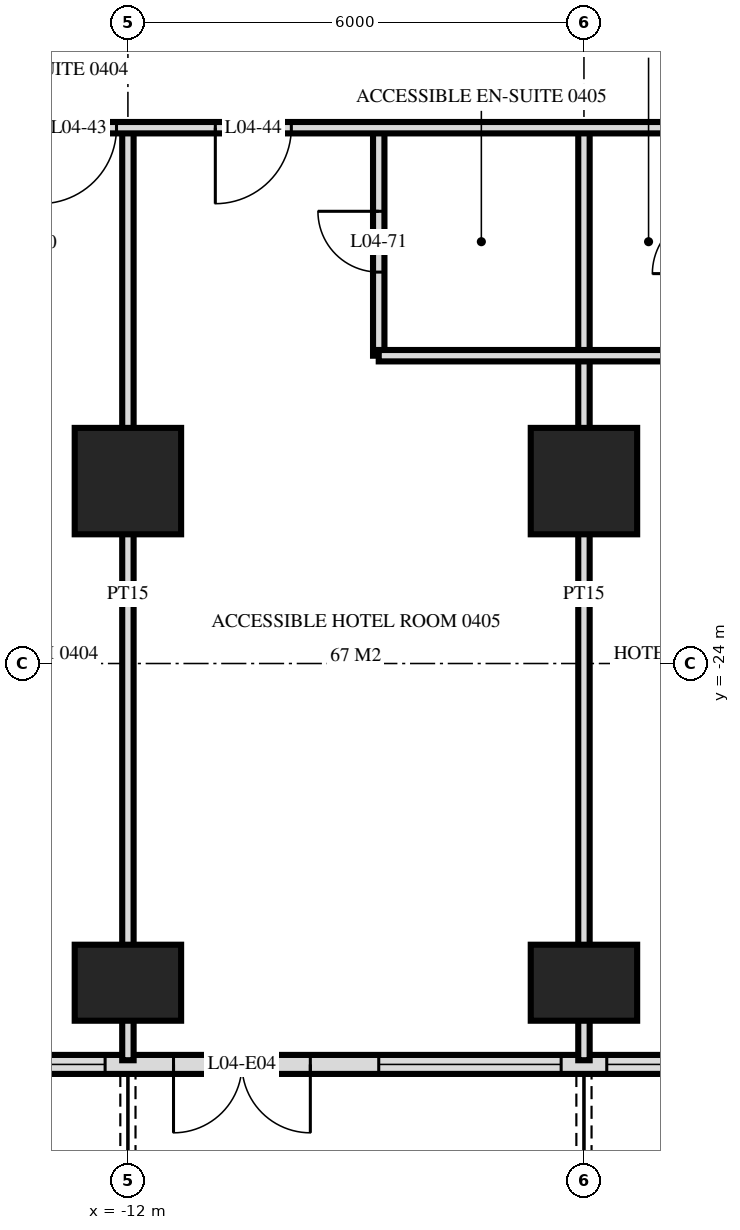
"""IFC4 building model, lengths in metres.
Left out: names, types, materials, properties, quantities, classifications, styles, units other than length and angle.
Written with IfcOpenShell. Run it as: python <this file> out.ifc"""

import sys

from ifc_helpers import new_model, si_unit, direction, frame, frame_2d, origin, origin_2d, place, context, subcontext, project, spatial, rectangle, extrude, element, fill, save


model = new_model("IFC4")
c1 = context("Model", 3, precision=1e-05, world=origin(), true_north=direction((0.0, 1.0)))
c2 = subcontext(c1, "Body", "Model", "MODEL_VIEW")
j1 = project(units=[si_unit("LENGTHUNIT", "METRE"), si_unit("PLANEANGLEUNIT", "RADIAN")], contexts=[c1])
p1 = place(None, origin())
s1 = spatial("IfcSite", under=j1, at=p1, CompositionType="ELEMENT")
p2 = place(p1, origin())
s2 = spatial("IfcBuilding", under=s1, at=p2, CompositionType="ELEMENT")
p3 = place(p2, frame((0.0, 0.0, 24.0)))
s3 = spatial("IfcBuildingStorey", under=s2, at=p3, CompositionType="ELEMENT", Elevation=24.0)
p4 = place(p3, frame((-12.0, -28.2, -0.28), z_axis=(0.0, 0.0, 1.0), x_axis=(1.0, 0.0, 0.0)))
e1 = element("IfcColumn", 1, at=p4, inside=s3, PredefinedType="COLUMN", context=c2, shape_type="SweptSolid", body=[
    extrude(rectangle(XDim=1.4, YDim=1.0, at=origin_2d()), origin(), (0.0, 0.0, 1.0), 3.88),
])
p5 = place(p3, frame((-12.0, -21.6, -0.28), z_axis=(0.0, 0.0, 1.0), x_axis=(1.0, 0.0, 0.0)))
e2 = element("IfcColumn", 2, at=p5, inside=s3, PredefinedType="COLUMN", context=c2, shape_type="SweptSolid", body=[
    extrude(rectangle(XDim=1.4, YDim=1.4, at=origin_2d()), origin(), (0.0, 0.0, 1.0), 3.88),
])
p6 = place(p3, frame((-6.0, -28.2, -0.28), z_axis=(0.0, 0.0, 1.0), x_axis=(1.0, 0.0, 0.0)))
e3 = element("IfcColumn", 3, at=p6, inside=s3, PredefinedType="COLUMN", context=c2, shape_type="SweptSolid", body=[
    extrude(rectangle(XDim=1.4, YDim=1.0, at=origin_2d()), origin(), (0.0, 0.0, 1.0), 3.88),
])
p7 = place(p3, frame((-6.0, -21.6, -0.28), z_axis=(0.0, 0.0, 1.0), x_axis=(1.0, 0.0, 0.0)))
e4 = element("IfcColumn", 4, at=p7, inside=s3, PredefinedType="COLUMN", context=c2, shape_type="SweptSolid", body=[
    extrude(rectangle(XDim=1.4, YDim=1.4, at=origin_2d()), origin(), (0.0, 0.0, 1.0), 3.88),
])
p8 = place(p3, frame((-28.775, -29.275, 0.0), z_axis=(0.0, 0.0, 1.0), x_axis=(1.0, 0.0, 0.0)))
e5 = element("IfcWall", 5, at=p8, inside=s3, PredefinedType="SOLIDWALL", context=c2, shape_type="SweptSolid", body=[
    extrude(rectangle(XDim=57.551, YDim=0.25, at=frame_2d((28.775, 0.0))), origin(), (0.0, 0.0, 1.0), 3.32),
])
p9 = place(p8, frame((0.575, 0.0, 0.0)))
e6 = element("IfcOpeningElement", 6, at=p9, cuts=e5, PredefinedType="OPENING", context=c2, shape_type="SweptSolid", body=[
    extrude(rectangle(XDim=1.8, YDim=2.4, at=frame_2d((0.9, 1.2))), frame((0.0, 0.135, 0.0), z_axis=(0.0, -1.0, 0.0), x_axis=(1.0, 0.0, 0.0)), (0.0, 0.0, 1.0), 0.27),
])
p10 = place(p8, frame((5.375, 0.0, 0.0)))
e7 = element("IfcOpeningElement", 7, at=p10, cuts=e5, PredefinedType="OPENING", context=c2, shape_type="SweptSolid", body=[
    extrude(rectangle(XDim=1.8, YDim=2.4, at=frame_2d((0.9, 1.2))), frame((0.0, 0.135, 0.0), z_axis=(0.0, -1.0, 0.0), x_axis=(1.0, 0.0, 0.0)), (0.0, 0.0, 1.0), 0.27),
])
p11 = place(p8, frame((8.075, 0.0, 0.3)))
e8 = element("IfcOpeningElement", 8, at=p11, cuts=e5, PredefinedType="OPENING", context=c2, shape_type="SweptSolid", body=[
    extrude(rectangle(XDim=2.4, YDim=2.1, at=frame_2d((1.2, 1.05))), frame((0.0, 0.135, 0.0), z_axis=(0.0, -1.0, 0.0), x_axis=(1.0, 0.0, 0.0)), (0.0, 0.0, 1.0), 0.27),
])
p12 = place(p8, frame((11.375, 0.0, 0.0)))
e9 = element("IfcOpeningElement", 9, at=p12, cuts=e5, PredefinedType="OPENING", context=c2, shape_type="SweptSolid", body=[
    extrude(rectangle(XDim=1.8, YDim=2.4, at=frame_2d((0.9, 1.2))), frame((0.0, 0.135, 0.0), z_axis=(0.0, -1.0, 0.0), x_axis=(1.0, 0.0, 0.0)), (0.0, 0.0, 1.0), 0.27),
])
p13 = place(p8, frame((14.075, 0.0, 0.3)))
e10 = element("IfcOpeningElement", 10, at=p13, cuts=e5, PredefinedType="OPENING", context=c2, shape_type="SweptSolid", body=[
    extrude(rectangle(XDim=2.4, YDim=2.1, at=frame_2d((1.2, 1.05))), frame((0.0, 0.135, 0.0), z_axis=(0.0, -1.0, 0.0), x_axis=(1.0, 0.0, 0.0)), (0.0, 0.0, 1.0), 0.27),
])
p14 = place(p8, frame((17.375, 0.0, 0.0)))
e11 = element("IfcOpeningElement", 11, at=p14, cuts=e5, PredefinedType="OPENING", context=c2, shape_type="SweptSolid", body=[
    extrude(rectangle(XDim=1.8, YDim=2.4, at=frame_2d((0.9, 1.2))), frame((0.0, 0.135, 0.0), z_axis=(0.0, -1.0, 0.0), x_axis=(1.0, 0.0, 0.0)), (0.0, 0.0, 1.0), 0.27),
])
p15 = place(p8, frame((20.075, 0.0, 0.3)))
e12 = element("IfcOpeningElement", 12, at=p15, cuts=e5, PredefinedType="OPENING", context=c2, shape_type="SweptSolid", body=[
    extrude(rectangle(XDim=2.4, YDim=2.1, at=frame_2d((1.2, 1.05))), frame((0.0, 0.135, 0.0), z_axis=(0.0, -1.0, 0.0), x_axis=(1.0, 0.0, 0.0)), (0.0, 0.0, 1.0), 0.27),
])
p16 = place(p8, frame((23.075, 0.0, 0.3)))
e13 = element("IfcOpeningElement", 13, at=p16, cuts=e5, PredefinedType="OPENING", context=c2, shape_type="SweptSolid", body=[
    extrude(rectangle(XDim=2.4, YDim=2.1, at=frame_2d((1.2, 1.05))), frame((0.0, 0.135, 0.0), z_axis=(0.0, -1.0, 0.0), x_axis=(1.0, 0.0, 0.0)), (0.0, 0.0, 1.0), 0.27),
])
p17 = place(p8, frame((26.375, 0.0, 0.0)))
e14 = element("IfcOpeningElement", 14, at=p17, cuts=e5, PredefinedType="OPENING", context=c2, shape_type="SweptSolid", body=[
    extrude(rectangle(XDim=1.8, YDim=2.4, at=frame_2d((0.9, 1.2))), frame((0.0, 0.135, 0.0), z_axis=(0.0, -1.0, 0.0), x_axis=(1.0, 0.0, 0.0)), (0.0, 0.0, 1.0), 0.27),
])
p18 = place(p8, frame((29.375, 0.0, 0.0)))
e15 = element("IfcOpeningElement", 15, at=p18, cuts=e5, PredefinedType="OPENING", context=c2, shape_type="SweptSolid", body=[
    extrude(rectangle(XDim=1.8, YDim=2.4, at=frame_2d((0.9, 1.2))), frame((0.0, 0.135, 0.0), z_axis=(0.0, -1.0, 0.0), x_axis=(1.0, 0.0, 0.0)), (0.0, 0.0, 1.0), 0.27),
])
p19 = place(p8, frame((32.075, 0.0, 0.3)))
e16 = element("IfcOpeningElement", 16, at=p19, cuts=e5, PredefinedType="OPENING", context=c2, shape_type="SweptSolid", body=[
    extrude(rectangle(XDim=2.4, YDim=2.1, at=frame_2d((1.2, 1.05))), frame((0.0, 0.135, 0.0), z_axis=(0.0, -1.0, 0.0), x_axis=(1.0, 0.0, 0.0)), (0.0, 0.0, 1.0), 0.27),
])
p20 = place(p8, frame((35.375, 0.0, 0.0)))
e17 = element("IfcOpeningElement", 17, at=p20, cuts=e5, PredefinedType="OPENING", context=c2, shape_type="SweptSolid", body=[
    extrude(rectangle(XDim=1.8, YDim=2.4, at=frame_2d((0.9, 1.2))), frame((0.0, 0.135, 0.0), z_axis=(0.0, -1.0, 0.0), x_axis=(1.0, 0.0, 0.0)), (0.0, 0.0, 1.0), 0.27),
])
p21 = place(p8, frame((38.075, 0.0, 0.3)))
e18 = element("IfcOpeningElement", 18, at=p21, cuts=e5, PredefinedType="OPENING", context=c2, shape_type="SweptSolid", body=[
    extrude(rectangle(XDim=2.4, YDim=2.1, at=frame_2d((1.2, 1.05))), frame((0.0, 0.135, 0.0), z_axis=(0.0, -1.0, 0.0), x_axis=(1.0, 0.0, 0.0)), (0.0, 0.0, 1.0), 0.27),
])
p22 = place(p8, frame((41.375, 0.0, 0.0)))
e19 = element("IfcOpeningElement", 19, at=p22, cuts=e5, PredefinedType="OPENING", context=c2, shape_type="SweptSolid", body=[
    extrude(rectangle(XDim=1.8, YDim=2.4, at=frame_2d((0.9, 1.2))), frame((0.0, 0.135, 0.0), z_axis=(0.0, -1.0, 0.0), x_axis=(1.0, 0.0, 0.0)), (0.0, 0.0, 1.0), 0.27),
])
p23 = place(p8, frame((44.075, 0.0, 0.3)))
e20 = element("IfcOpeningElement", 20, at=p23, cuts=e5, PredefinedType="OPENING", context=c2, shape_type="SweptSolid", body=[
    extrude(rectangle(XDim=2.4, YDim=2.1, at=frame_2d((1.2, 1.05))), frame((0.0, 0.135, 0.0), z_axis=(0.0, -1.0, 0.0), x_axis=(1.0, 0.0, 0.0)), (0.0, 0.0, 1.0), 0.27),
])
p24 = place(p8, frame((47.075, 0.0, 0.3)))
e21 = element("IfcOpeningElement", 21, at=p24, cuts=e5, PredefinedType="OPENING", context=c2, shape_type="SweptSolid", body=[
    extrude(rectangle(XDim=2.4, YDim=2.1, at=frame_2d((1.2, 1.05))), frame((0.0, 0.135, 0.0), z_axis=(0.0, -1.0, 0.0), x_axis=(1.0, 0.0, 0.0)), (0.0, 0.0, 1.0), 0.27),
])
p25 = place(p8, frame((50.375, 0.0, 0.0)))
e22 = element("IfcOpeningElement", 22, at=p25, cuts=e5, PredefinedType="OPENING", context=c2, shape_type="SweptSolid", body=[
    extrude(rectangle(XDim=1.8, YDim=2.4, at=frame_2d((0.9, 1.2))), frame((0.0, 0.135, 0.0), z_axis=(0.0, -1.0, 0.0), x_axis=(1.0, 0.0, 0.0)), (0.0, 0.0, 1.0), 0.27),
])
p26 = place(p8, frame((53.375, 0.0, 0.0)))
e23 = element("IfcOpeningElement", 23, at=p26, cuts=e5, PredefinedType="OPENING", context=c2, shape_type="SweptSolid", body=[
    extrude(rectangle(XDim=1.8, YDim=2.4, at=frame_2d((0.9, 1.2))), frame((0.0, 0.135, 0.0), z_axis=(0.0, -1.0, 0.0), x_axis=(1.0, 0.0, 0.0)), (0.0, 0.0, 1.0), 0.27),
])
p27 = place(p3, frame((-6.0, -29.22, 0.0), z_axis=(0.0, 0.0, 1.0), x_axis=(0.0, 1.0, 0.0)))
e24 = element("IfcWall", 24, at=p27, inside=s3, PredefinedType="PARTITIONING", context=c2, shape_type="SweptSolid", body=[
    extrude(rectangle(XDim=12.27, YDim=0.15, at=frame_2d((6.135, 0.0))), origin(), (0.0, 0.0, 1.0), 3.32),
])
p28 = place(p3, frame((-8.7, -19.95, 0.0), z_axis=(0.0, 0.0, 1.0), x_axis=(0.0, 1.0, 0.0)))
e25 = element("IfcWall", 25, at=p28, inside=s3, PredefinedType="PARTITIONING", context=c2, shape_type="SweptSolid", body=[
    extrude(rectangle(XDim=3.0, YDim=0.15, at=frame_2d((1.5, 0.0))), origin(), (0.0, 0.0, 1.0), 3.32),
])
p29 = place(p28, frame((1.1, 0.0, 0.0)))
e26 = element("IfcOpeningElement", 26, at=p29, cuts=e25, PredefinedType="OPENING", context=c2, shape_type="SweptSolid", body=[
    extrude(rectangle(XDim=0.8, YDim=2.1, at=frame_2d((0.4, 1.05))), frame((0.0, 0.085, 0.0), z_axis=(0.0, -1.0, 0.0), x_axis=(1.0, 0.0, 0.0)), (0.0, 0.0, 1.0), 0.17),
])
p30 = place(p3, frame((-12.0, -29.22, 0.0), z_axis=(0.0, 0.0, 1.0), x_axis=(0.0, 1.0, 0.0)))
e27 = element("IfcWall", 27, at=p30, inside=s3, PredefinedType="PARTITIONING", context=c2, shape_type="SweptSolid", body=[
    extrude(rectangle(XDim=12.27, YDim=0.15, at=frame_2d((6.135, 0.0))), origin(), (0.0, 0.0, 1.0), 3.32),
])
p31 = place(p3, frame((-8.7, -19.95, 0.0), z_axis=(0.0, 0.0, 1.0), x_axis=(1.0, 0.0, 0.0)))
e28 = element("IfcWall", 28, at=p31, inside=s3, PredefinedType="PARTITIONING", context=c2, shape_type="SweptSolid", body=[
    extrude(rectangle(XDim=4.4, YDim=0.15, at=frame_2d((2.2, 0.0))), origin(), (0.0, 0.0, 1.0), 3.32),
])
p32 = place(p3, frame((-33.12, -16.95, 0.0), z_axis=(0.0, 0.0, 1.0), x_axis=(1.0, 0.0, 0.0)))
e29 = element("IfcWall", 29, at=p32, inside=s3, PredefinedType="PARTITIONING", context=c2, shape_type="SweptSolid", body=[
    extrude(rectangle(XDim=66.24, YDim=0.15, at=frame_2d((33.12, 0.0))), origin(), (0.0, 0.0, 1.0), 3.32),
])
p33 = place(p32, frame((9.27, 0.0, 0.0)))
e30 = element("IfcOpeningElement", 30, at=p33, cuts=e29, PredefinedType="OPENING", context=c2, shape_type="SweptSolid", body=[
    extrude(rectangle(XDim=1.0, YDim=2.1, at=frame_2d((0.5, 1.05))), frame((0.0, 0.085, 0.0), z_axis=(0.0, -1.0, 0.0), x_axis=(1.0, 0.0, 0.0)), (0.0, 0.0, 1.0), 0.17),
])
p34 = place(p32, frame((13.97, 0.0, 0.0)))
e31 = element("IfcOpeningElement", 31, at=p34, cuts=e29, PredefinedType="OPENING", context=c2, shape_type="SweptSolid", body=[
    extrude(rectangle(XDim=1.0, YDim=2.1, at=frame_2d((0.5, 1.05))), frame((0.0, 0.085, 0.0), z_axis=(0.0, -1.0, 0.0), x_axis=(1.0, 0.0, 0.0)), (0.0, 0.0, 1.0), 0.17),
])
p35 = place(p32, frame((15.27, 0.0, 0.0)))
e32 = element("IfcOpeningElement", 32, at=p35, cuts=e29, PredefinedType="OPENING", context=c2, shape_type="SweptSolid", body=[
    extrude(rectangle(XDim=1.0, YDim=2.1, at=frame_2d((0.5, 1.05))), frame((0.0, 0.085, 0.0), z_axis=(0.0, -1.0, 0.0), x_axis=(1.0, 0.0, 0.0)), (0.0, 0.0, 1.0), 0.17),
])
p36 = place(p32, frame((19.97, 0.0, 0.0)))
e33 = element("IfcOpeningElement", 33, at=p36, cuts=e29, PredefinedType="OPENING", context=c2, shape_type="SweptSolid", body=[
    extrude(rectangle(XDim=1.0, YDim=2.1, at=frame_2d((0.5, 1.05))), frame((0.0, 0.085, 0.0), z_axis=(0.0, -1.0, 0.0), x_axis=(1.0, 0.0, 0.0)), (0.0, 0.0, 1.0), 0.17),
])
p37 = place(p32, frame((22.27, 0.0, 0.0)))
e34 = element("IfcOpeningElement", 34, at=p37, cuts=e29, PredefinedType="OPENING", context=c2, shape_type="SweptSolid", body=[
    extrude(rectangle(XDim=1.0, YDim=2.1, at=frame_2d((0.5, 1.05))), frame((0.0, 0.085, 0.0), z_axis=(0.0, -1.0, 0.0), x_axis=(1.0, 0.0, 0.0)), (0.0, 0.0, 1.0), 0.17),
])
p38 = place(p32, frame((28.97, 0.0, 0.0)))
e35 = element("IfcOpeningElement", 35, at=p38, cuts=e29, PredefinedType="OPENING", context=c2, shape_type="SweptSolid", body=[
    extrude(rectangle(XDim=1.0, YDim=2.1, at=frame_2d((0.5, 1.05))), frame((0.0, 0.085, 0.0), z_axis=(0.0, -1.0, 0.0), x_axis=(1.0, 0.0, 0.0)), (0.0, 0.0, 1.0), 0.17),
])
p39 = place(p32, frame((30.27, 0.0, 0.0)))
e36 = element("IfcOpeningElement", 36, at=p39, cuts=e29, PredefinedType="OPENING", context=c2, shape_type="SweptSolid", body=[
    extrude(rectangle(XDim=1.0, YDim=2.1, at=frame_2d((0.5, 1.05))), frame((0.0, 0.085, 0.0), z_axis=(0.0, -1.0, 0.0), x_axis=(1.0, 0.0, 0.0)), (0.0, 0.0, 1.0), 0.17),
])
p40 = place(p32, frame((34.97, 0.0, 0.0)))
e37 = element("IfcOpeningElement", 37, at=p40, cuts=e29, PredefinedType="OPENING", context=c2, shape_type="SweptSolid", body=[
    extrude(rectangle(XDim=1.0, YDim=2.1, at=frame_2d((0.5, 1.05))), frame((0.0, 0.085, 0.0), z_axis=(0.0, -1.0, 0.0), x_axis=(1.0, 0.0, 0.0)), (0.0, 0.0, 1.0), 0.17),
])
p41 = place(p32, frame((36.27, 0.0, 0.0)))
e38 = element("IfcOpeningElement", 38, at=p41, cuts=e29, PredefinedType="OPENING", context=c2, shape_type="SweptSolid", body=[
    extrude(rectangle(XDim=1.0, YDim=2.1, at=frame_2d((0.5, 1.05))), frame((0.0, 0.085, 0.0), z_axis=(0.0, -1.0, 0.0), x_axis=(1.0, 0.0, 0.0)), (0.0, 0.0, 1.0), 0.17),
])
p42 = place(p32, frame((40.97, 0.0, 0.0)))
e39 = element("IfcOpeningElement", 39, at=p42, cuts=e29, PredefinedType="OPENING", context=c2, shape_type="SweptSolid", body=[
    extrude(rectangle(XDim=1.0, YDim=2.1, at=frame_2d((0.5, 1.05))), frame((0.0, 0.085, 0.0), z_axis=(0.0, -1.0, 0.0), x_axis=(1.0, 0.0, 0.0)), (0.0, 0.0, 1.0), 0.17),
])
p43 = place(p32, frame((42.27, 0.0, 0.0)))
e40 = element("IfcOpeningElement", 40, at=p43, cuts=e29, PredefinedType="OPENING", context=c2, shape_type="SweptSolid", body=[
    extrude(rectangle(XDim=1.0, YDim=2.1, at=frame_2d((0.5, 1.05))), frame((0.0, 0.085, 0.0), z_axis=(0.0, -1.0, 0.0), x_axis=(1.0, 0.0, 0.0)), (0.0, 0.0, 1.0), 0.17),
])
p44 = place(p32, frame((46.97, 0.0, 0.0)))
e41 = element("IfcOpeningElement", 41, at=p44, cuts=e29, PredefinedType="OPENING", context=c2, shape_type="SweptSolid", body=[
    extrude(rectangle(XDim=1.0, YDim=2.1, at=frame_2d((0.5, 1.05))), frame((0.0, 0.085, 0.0), z_axis=(0.0, -1.0, 0.0), x_axis=(1.0, 0.0, 0.0)), (0.0, 0.0, 1.0), 0.17),
])
p45 = place(p32, frame((48.27, 0.0, 0.0)))
e42 = element("IfcOpeningElement", 42, at=p45, cuts=e29, PredefinedType="OPENING", context=c2, shape_type="SweptSolid", body=[
    extrude(rectangle(XDim=1.0, YDim=2.1, at=frame_2d((0.5, 1.05))), frame((0.0, 0.085, 0.0), z_axis=(0.0, -1.0, 0.0), x_axis=(1.0, 0.0, 0.0)), (0.0, 0.0, 1.0), 0.17),
])
p46 = place(p32, frame((52.97, 0.0, 0.0)))
e43 = element("IfcOpeningElement", 43, at=p46, cuts=e29, PredefinedType="OPENING", context=c2, shape_type="SweptSolid", body=[
    extrude(rectangle(XDim=1.0, YDim=2.1, at=frame_2d((0.5, 1.05))), frame((0.0, 0.085, 0.0), z_axis=(0.0, -1.0, 0.0), x_axis=(1.0, 0.0, 0.0)), (0.0, 0.0, 1.0), 0.17),
])
p47 = place(p32, frame((54.27, 0.0, 0.0)))
e44 = element("IfcOpeningElement", 44, at=p47, cuts=e29, PredefinedType="OPENING", context=c2, shape_type="SweptSolid", body=[
    extrude(rectangle(XDim=1.0, YDim=2.1, at=frame_2d((0.5, 1.05))), frame((0.0, 0.085, 0.0), z_axis=(0.0, -1.0, 0.0), x_axis=(1.0, 0.0, 0.0)), (0.0, 0.0, 1.0), 0.17),
])
p48 = place(p32, frame((4.4, 0.0, 0.0)))
e45 = element("IfcOpeningElement", 45, at=p48, cuts=e29, PredefinedType="OPENING", context=c2, shape_type="SweptSolid", body=[
    extrude(rectangle(XDim=1.0, YDim=2.1, at=frame_2d((0.5, 1.05))), frame((0.0, 0.085, 0.0), z_axis=(0.0, -1.0, 0.0), x_axis=(1.0, 0.0, 0.0)), (0.0, 0.0, 1.0), 0.17),
])
p49 = place(p32, frame((60.8, 0.0, 0.0)))
e46 = element("IfcOpeningElement", 46, at=p49, cuts=e29, PredefinedType="OPENING", context=c2, shape_type="SweptSolid", body=[
    extrude(rectangle(XDim=1.0, YDim=2.1, at=frame_2d((0.5, 1.05))), frame((0.0, 0.085, 0.0), z_axis=(0.0, -1.0, 0.0), x_axis=(1.0, 0.0, 0.0)), (0.0, 0.0, 1.0), 0.17),
])
p50 = place(p13, origin())
e47 = element("IfcWindow", 47, at=p50, inside=s3, PartitioningType="SINGLE_PANEL", PredefinedType="WINDOW", context=c2, shape_type="SweptSolid", body=[
    extrude(rectangle(XDim=2.4, YDim=2.1, at=frame_2d((1.2, 1.05))), frame((0.0, 0.03, 0.0), z_axis=(0.0, -1.0, 0.0), x_axis=(1.0, 0.0, 0.0)), (0.0, 0.0, 1.0), 0.06),
])
fill(e10, e47)
p51 = place(p14, frame((0.9, 0.0, 0.0), z_axis=(0.0, 0.0, 1.0), x_axis=(-1.0, 0.0, 0.0)))
e48 = element("IfcDoor", 48, at=p51, inside=s3, OperationType="DOUBLE_DOOR_SINGLE_SWING", PredefinedType="DOOR", context=c2, shape_type="SweptSolid", body=[
    extrude(rectangle(XDim=1.8, YDim=2.4, at=frame_2d((0.0, 1.2))), frame((0.0, -0.025, 0.0), z_axis=(0.0, 1.0, 0.0), x_axis=(-1.0, 0.0, 0.0)), (0.0, 0.0, 1.0), 0.05),
])
fill(e11, e48)
p52 = place(p15, origin())
e49 = element("IfcWindow", 49, at=p52, inside=s3, PartitioningType="SINGLE_PANEL", PredefinedType="WINDOW", context=c2, shape_type="SweptSolid", body=[
    extrude(rectangle(XDim=2.4, YDim=2.1, at=frame_2d((1.2, 1.05))), frame((0.0, 0.03, 0.0), z_axis=(0.0, -1.0, 0.0), x_axis=(1.0, 0.0, 0.0)), (0.0, 0.0, 1.0), 0.06),
])
fill(e12, e49)
p53 = place(p16, origin())
e50 = element("IfcWindow", 50, at=p53, inside=s3, PartitioningType="SINGLE_PANEL", PredefinedType="WINDOW", context=c2, shape_type="SweptSolid", body=[
    extrude(rectangle(XDim=2.4, YDim=2.1, at=frame_2d((1.2, 1.05))), frame((0.0, 0.03, 0.0), z_axis=(0.0, -1.0, 0.0), x_axis=(1.0, 0.0, 0.0)), (0.0, 0.0, 1.0), 0.06),
])
fill(e13, e50)
p54 = place(p36, frame((0.5, 0.0, 0.0), z_axis=(0.0, 0.0, 1.0), x_axis=(-1.0, 0.0, 0.0)))
e51 = element("IfcDoor", 51, at=p54, inside=s3, OperationType="SINGLE_SWING_LEFT", PredefinedType="DOOR", context=c2, shape_type="SweptSolid", body=[
    extrude(rectangle(XDim=1.0, YDim=2.1, at=frame_2d((0.0, 1.05))), frame((0.0, -0.025, 0.0), z_axis=(0.0, 1.0, 0.0), x_axis=(-1.0, 0.0, 0.0)), (0.0, 0.0, 1.0), 0.05),
])
fill(e33, e51)
p55 = place(p37, frame((0.5, 0.0, 0.0), z_axis=(0.0, 0.0, 1.0), x_axis=(-1.0, 0.0, 0.0)))
e52 = element("IfcDoor", 52, at=p55, inside=s3, OperationType="SINGLE_SWING_LEFT", PredefinedType="DOOR", context=c2, shape_type="SweptSolid", body=[
    extrude(rectangle(XDim=1.0, YDim=2.1, at=frame_2d((0.0, 1.05))), frame((0.0, -0.025, 0.0), z_axis=(0.0, 1.0, 0.0), x_axis=(-1.0, 0.0, 0.0)), (0.0, 0.0, 1.0), 0.05),
])
fill(e34, e52)
p56 = place(p29, origin())
e53 = element("IfcDoor", 53, at=p56, inside=s3, OperationType="SINGLE_SWING_LEFT", PredefinedType="DOOR", context=c2, shape_type="SweptSolid", body=[
    extrude(rectangle(XDim=0.8, YDim=2.1, at=frame_2d((0.4, 1.05))), frame((0.0, 0.025, 0.0), z_axis=(0.0, -1.0, 0.0), x_axis=(1.0, 0.0, 0.0)), (0.0, 0.0, 1.0), 0.05),
])
fill(e26, e53)
save(model, sys.argv[1])
